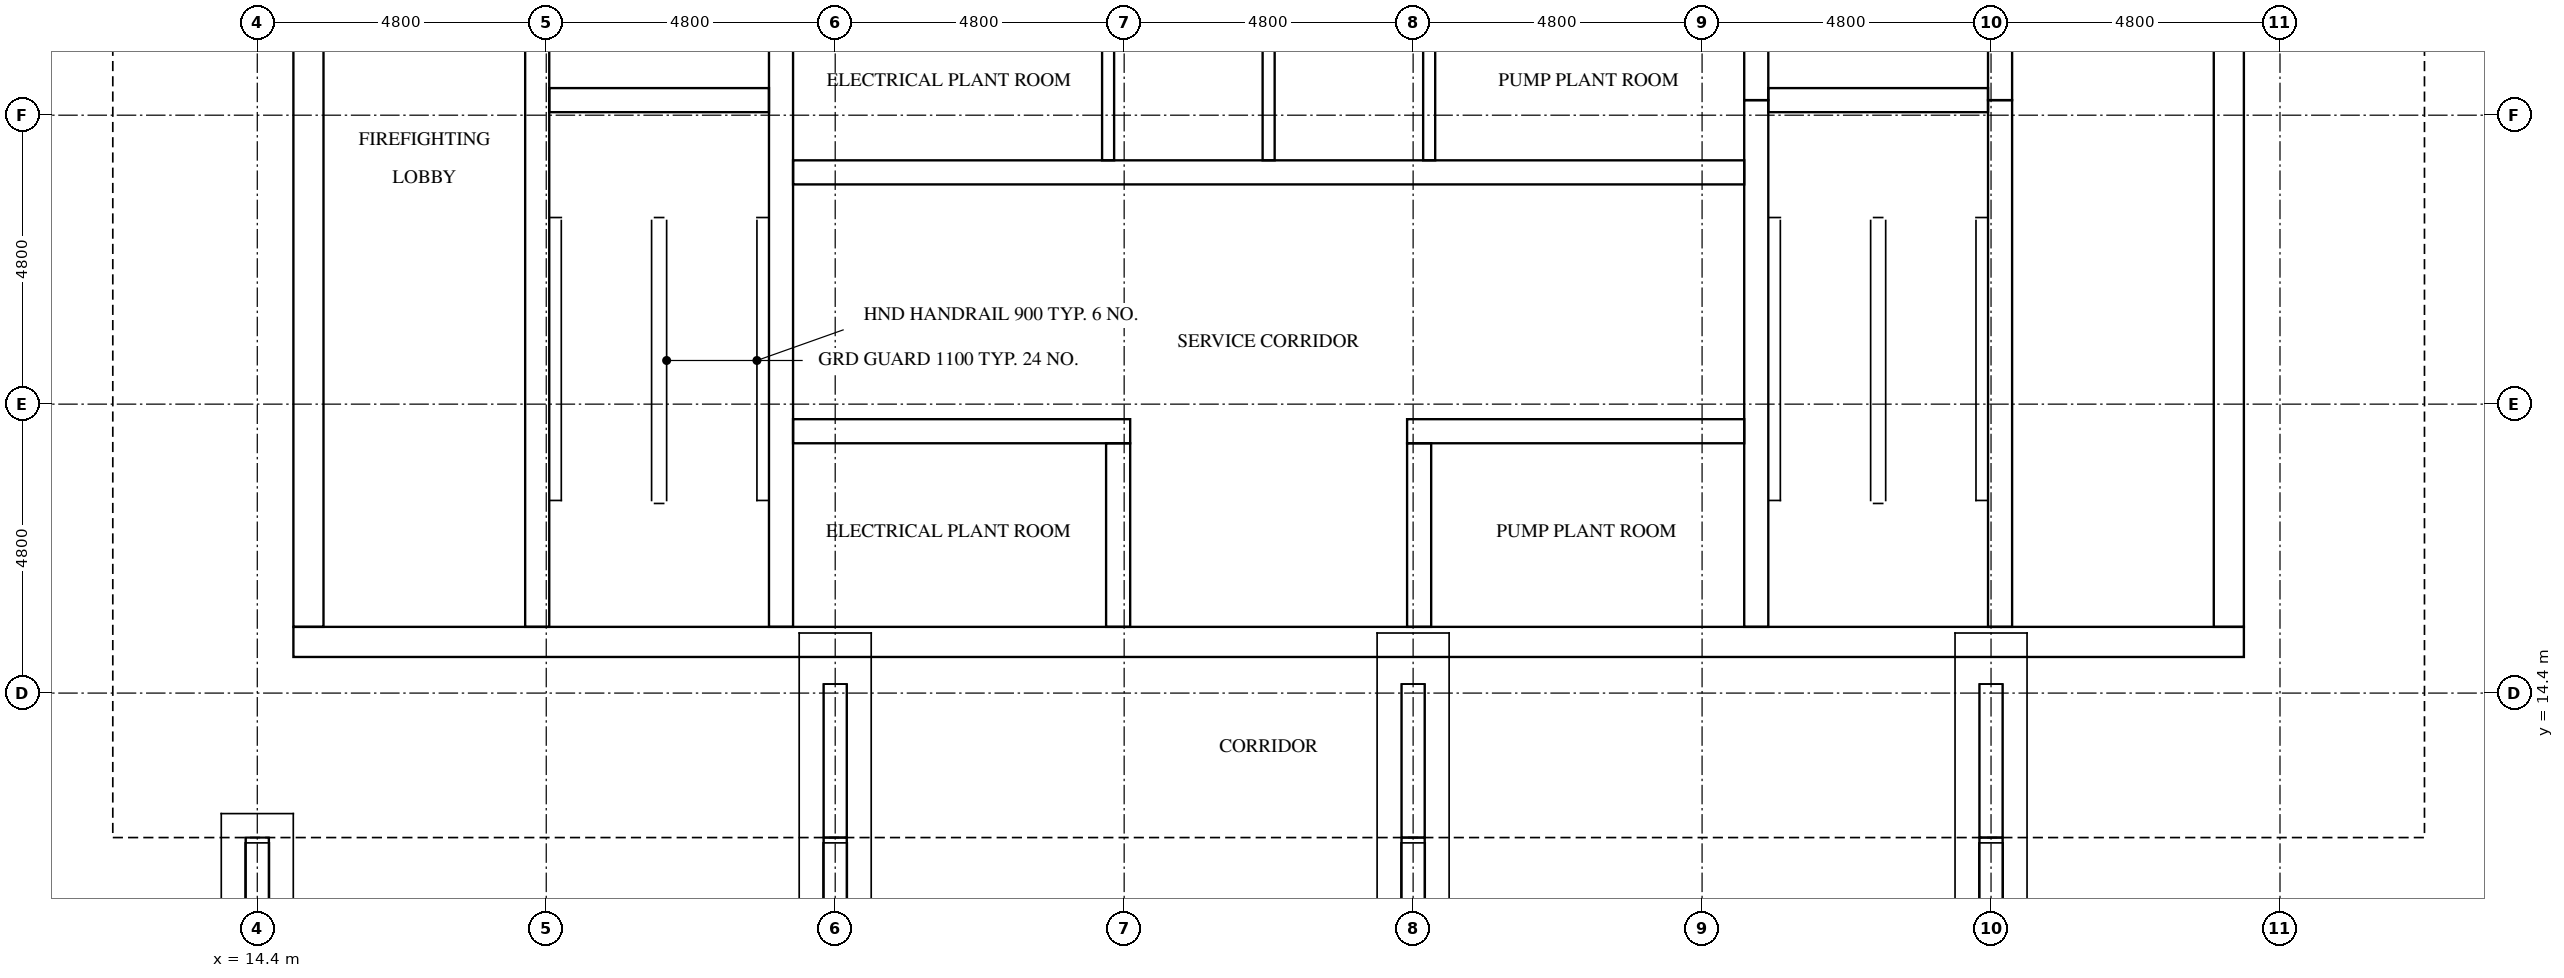
"""IFC4 building model, lengths in metres.
Left out: names, types, materials, properties, quantities, classifications, styles, units other than length and angle.
Written with IfcOpenShell. Run it as: python <this file> out.ifc"""

import sys

from ifc_helpers import new_model, si_unit, direction, frame, frame_2d, origin, place, context, subcontext, project, spatial, rectangle, extrude, element, fill, save


model = new_model("IFC4")
c1 = context("Model", 3, precision=1e-05, world=origin(), true_north=direction((0.0, 1.0)))
c2 = subcontext(c1, "Body", "Model", "MODEL_VIEW")
j1 = project(units=[si_unit("LENGTHUNIT", "METRE"), si_unit("PLANEANGLEUNIT", "RADIAN")], contexts=[c1])
p1 = place(None, origin())
s1 = spatial("IfcSite", under=j1, at=p1, CompositionType="ELEMENT")
p2 = place(p1, origin())
s2 = spatial("IfcBuilding", under=s1, at=p2, CompositionType="ELEMENT")
p3 = place(p2, frame((0.0, 0.0, 263.2)))
s3 = spatial("IfcBuildingStorey", under=s2, at=p3, CompositionType="ELEMENT", Elevation=263.2)
p4 = place(p3, frame((15.0, 15.25, 0.0), z_axis=(0.0, 0.0, 1.0), x_axis=(1.0, 0.0, 0.0)))
e1 = element("IfcWall", 1, at=p4, inside=s3, PredefinedType="SHEAR", context=c2, shape_type="SweptSolid", body=[
    extrude(rectangle(XDim=32.4, YDim=0.5, at=frame_2d((16.2, 0.0))), origin(), (0.0, 0.0, 1.0), 5.1),
])
p5 = place(p4, frame((15.3, 0.0, 0.0)))
e2 = element("IfcOpeningElement", 2, at=p5, cuts=e1, PredefinedType="OPENING", context=c2, shape_type="SweptSolid", body=[
    extrude(rectangle(XDim=1.8, YDim=2.1, at=frame_2d((0.9, 1.05))), frame((0.0, 0.26, 0.0), z_axis=(0.0, -1.0, 0.0), x_axis=(1.0, 0.0, 0.0)), (0.0, 0.0, 1.0), 0.52),
])
p6 = place(p3, frame((15.25, 15.5, 0.0), z_axis=(0.0, 0.0, 1.0), x_axis=(0.0, 1.0, 0.0)))
e3 = element("IfcWall", 3, at=p6, inside=s3, PredefinedType="SHEAR", context=c2, shape_type="SweptSolid", body=[
    extrude(rectangle(XDim=21.8, YDim=0.5, at=frame_2d((10.9, 0.0))), origin(), (0.0, 0.0, 1.0), 5.1),
])
p7 = place(p6, frame((5.26, 0.0, 0.0)))
e4 = element("IfcOpeningElement", 4, at=p7, cuts=e3, PredefinedType="OPENING", context=c2, shape_type="SweptSolid", body=[
    extrude(rectangle(XDim=1.2, YDim=2.1, at=frame_2d((0.6, 1.05))), frame((0.0, 0.26, 0.0), z_axis=(0.0, -1.0, 0.0), x_axis=(1.0, 0.0, 0.0)), (0.0, 0.0, 1.0), 0.52),
])
p8 = place(p3, frame((47.15, 15.5, 0.0), z_axis=(0.0, 0.0, 1.0), x_axis=(0.0, 1.0, 0.0)))
e5 = element("IfcWall", 5, at=p8, inside=s3, PredefinedType="SHEAR", context=c2, shape_type="SweptSolid", body=[
    extrude(rectangle(XDim=21.8, YDim=0.5, at=frame_2d((10.9, 0.0))), origin(), (0.0, 0.0, 1.0), 5.1),
])
p9 = place(p8, frame((10.6, 0.0, 0.0)))
e6 = element("IfcOpeningElement", 6, at=p9, cuts=e5, PredefinedType="OPENING", context=c2, shape_type="SweptSolid", body=[
    extrude(rectangle(XDim=1.2, YDim=2.1, at=frame_2d((0.6, 1.05))), frame((0.0, 0.26, 0.0), z_axis=(0.0, -1.0, 0.0), x_axis=(1.0, 0.0, 0.0)), (0.0, 0.0, 1.0), 0.52),
])
p10 = place(p3, frame((19.05, 15.5, 0.0), z_axis=(0.0, 0.0, 1.0), x_axis=(0.0, 1.0, 0.0)))
e7 = element("IfcWall", 7, at=p10, inside=s3, PredefinedType="SHEAR", context=c2, shape_type="SweptSolid", body=[
    extrude(rectangle(XDim=15.55, YDim=0.4, at=frame_2d((7.775, 0.0))), origin(), (0.0, 0.0, 1.0), 5.1),
])
p11 = place(p10, frame((9.95, 0.0, 0.0)))
e8 = element("IfcOpeningElement", 8, at=p11, cuts=e7, PredefinedType="OPENING", context=c2, shape_type="SweptSolid", body=[
    extrude(rectangle(XDim=1.1, YDim=2.1, at=frame_2d((0.55, 1.05))), frame((0.0, 0.21, 0.0), z_axis=(0.0, -1.0, 0.0), x_axis=(1.0, 0.0, 0.0)), (0.0, 0.0, 1.0), 0.42),
])
p12 = place(p10, frame((13.45, 0.0, 0.0)))
e9 = element("IfcOpeningElement", 9, at=p12, cuts=e7, PredefinedType="OPENING", context=c2, shape_type="SweptSolid", body=[
    extrude(rectangle(XDim=1.1, YDim=2.1, at=frame_2d((0.55, 1.05))), frame((0.0, 0.21, 0.0), z_axis=(0.0, -1.0, 0.0), x_axis=(1.0, 0.0, 0.0)), (0.0, 0.0, 1.0), 0.42),
])
p13 = place(p10, frame((0.7, 0.0, 0.0)))
e10 = element("IfcOpeningElement", 10, at=p13, cuts=e7, PredefinedType="OPENING", context=c2, shape_type="SweptSolid", body=[
    extrude(rectangle(XDim=1.2, YDim=2.1, at=frame_2d((0.6, 1.05))), frame((0.0, 0.21, 0.0), z_axis=(0.0, -1.0, 0.0), x_axis=(1.0, 0.0, 0.0)), (0.0, 0.0, 1.0), 0.42),
])
p14 = place(p3, frame((23.1, 15.5, 0.0), z_axis=(0.0, 0.0, 1.0), x_axis=(0.0, 1.0, 0.0)))
e11 = element("IfcWall", 11, at=p14, inside=s3, PredefinedType="SHEAR", context=c2, shape_type="SweptSolid", body=[
    extrude(rectangle(XDim=21.8, YDim=0.4, at=frame_2d((10.9, 0.0))), origin(), (0.0, 0.0, 1.0), 5.1),
])
p15 = place(p3, frame((39.3, 15.5, 0.0), z_axis=(0.0, 0.0, 1.0), x_axis=(0.0, 1.0, 0.0)))
e12 = element("IfcWall", 12, at=p15, inside=s3, PredefinedType="SHEAR", context=c2, shape_type="SweptSolid", body=[
    extrude(rectangle(XDim=8.75, YDim=0.4, at=frame_2d((4.375, 0.0))), origin(), (0.0, 0.0, 1.0), 5.1),
])
p16 = place(p3, frame((39.3, 24.25, 0.0), z_axis=(0.0, 0.0, 1.0), x_axis=(0.0, 1.0, 0.0)))
e13 = element("IfcWall", 13, at=p16, inside=s3, PredefinedType="SHEAR", context=c2, shape_type="SweptSolid", body=[
    extrude(rectangle(XDim=3.5, YDim=0.4, at=frame_2d((1.75, 0.0))), origin(), (0.0, 0.0, 1.0), 5.1),
])
p17 = place(p3, frame((43.35, 15.5, 0.0), z_axis=(0.0, 0.0, 1.0), x_axis=(0.0, 1.0, 0.0)))
e14 = element("IfcWall", 14, at=p17, inside=s3, PredefinedType="SHEAR", context=c2, shape_type="SweptSolid", body=[
    extrude(rectangle(XDim=8.75, YDim=0.4, at=frame_2d((4.375, 0.0))), origin(), (0.0, 0.0, 1.0), 5.1),
])
p18 = place(p17, frame((0.7, 0.0, 0.0)))
e15 = element("IfcOpeningElement", 15, at=p18, cuts=e14, PredefinedType="OPENING", context=c2, shape_type="SweptSolid", body=[
    extrude(rectangle(XDim=1.2, YDim=2.1, at=frame_2d((0.6, 1.05))), frame((0.0, 0.21, 0.0), z_axis=(0.0, -1.0, 0.0), x_axis=(1.0, 0.0, 0.0)), (0.0, 0.0, 1.0), 0.42),
])
p19 = place(p3, frame((43.35, 24.25, 0.0), z_axis=(0.0, 0.0, 1.0), x_axis=(0.0, 1.0, 0.0)))
e16 = element("IfcWall", 16, at=p19, inside=s3, PredefinedType="SHEAR", context=c2, shape_type="SweptSolid", body=[
    extrude(rectangle(XDim=3.5, YDim=0.4, at=frame_2d((1.75, 0.0))), origin(), (0.0, 0.0, 1.0), 5.1),
])
p20 = place(p19, frame((1.2, 0.0, 0.0)))
e17 = element("IfcOpeningElement", 17, at=p20, cuts=e16, PredefinedType="OPENING", context=c2, shape_type="SweptSolid", body=[
    extrude(rectangle(XDim=1.1, YDim=2.1, at=frame_2d((0.55, 1.05))), frame((0.0, 0.21, 0.0), z_axis=(0.0, -1.0, 0.0), x_axis=(1.0, 0.0, 0.0)), (0.0, 0.0, 1.0), 0.42),
])
for number, where, z_axis, x_axis in (
    (18, (19.25, 24.25, 0.0), (0.0, 0.0, 1.0), (1.0, 0.0, 0.0)),
    (19, (39.5, 24.25, 0.0), (0.0, 0.0, 1.0), (1.0, 0.0, 0.0)),
):
    element("IfcWall", number, at=place(p3, frame(where, z_axis=z_axis, x_axis=x_axis)), inside=s3, PredefinedType="SHEAR", context=c2, shape_type="SweptSolid", body=[
        extrude(rectangle(XDim=3.65, YDim=0.4, at=frame_2d((1.825, 0.0))), origin(), (0.0, 0.0, 1.0), 5.1),
    ])
p21 = place(p3, frame((23.3, 18.75, 0.0), z_axis=(0.0, 0.0, 1.0), x_axis=(1.0, 0.0, 0.0)))
e20 = element("IfcWall", 20, at=p21, inside=s3, PredefinedType="SHEAR", context=c2, shape_type="SweptSolid", body=[
    extrude(rectangle(XDim=5.6, YDim=0.4, at=frame_2d((2.8, 0.0))), origin(), (0.0, 0.0, 1.0), 5.1),
])
p22 = place(p21, frame((2.1, 0.0, 0.0)))
e21 = element("IfcOpeningElement", 21, at=p22, cuts=e20, PredefinedType="OPENING", context=c2, shape_type="SweptSolid", body=[
    extrude(rectangle(XDim=1.0, YDim=2.1, at=frame_2d((0.5, 1.05))), frame((0.0, 0.21, 0.0), z_axis=(0.0, -1.0, 0.0), x_axis=(1.0, 0.0, 0.0)), (0.0, 0.0, 1.0), 0.42),
])
p23 = place(p3, frame((33.5, 18.75, 0.0), z_axis=(0.0, 0.0, 1.0), x_axis=(1.0, 0.0, 0.0)))
e22 = element("IfcWall", 22, at=p23, inside=s3, PredefinedType="SHEAR", context=c2, shape_type="SweptSolid", body=[
    extrude(rectangle(XDim=5.6, YDim=0.4, at=frame_2d((2.8, 0.0))), origin(), (0.0, 0.0, 1.0), 5.1),
])
p24 = place(p23, frame((2.5, 0.0, 0.0)))
e23 = element("IfcOpeningElement", 23, at=p24, cuts=e22, PredefinedType="OPENING", context=c2, shape_type="SweptSolid", body=[
    extrude(rectangle(XDim=1.0, YDim=2.1, at=frame_2d((0.5, 1.05))), frame((0.0, 0.21, 0.0), z_axis=(0.0, -1.0, 0.0), x_axis=(1.0, 0.0, 0.0)), (0.0, 0.0, 1.0), 0.42),
])
p25 = place(p3, frame((23.3, 23.05, 0.0), z_axis=(0.0, 0.0, 1.0), x_axis=(1.0, 0.0, 0.0)))
e24 = element("IfcWall", 24, at=p25, inside=s3, PredefinedType="SHEAR", context=c2, shape_type="SweptSolid", body=[
    extrude(rectangle(XDim=15.8, YDim=0.4, at=frame_2d((7.9, 0.0))), origin(), (0.0, 0.0, 1.0), 5.1),
])
p26 = place(p25, frame((2.067, 0.0, 0.0)))
e25 = element("IfcOpeningElement", 25, at=p26, cuts=e24, PredefinedType="OPENING", context=c2, shape_type="SweptSolid", body=[
    extrude(rectangle(XDim=1.0, YDim=2.1, at=frame_2d((0.5, 1.05))), frame((0.0, 0.21, 0.0), z_axis=(0.0, -1.0, 0.0), x_axis=(1.0, 0.0, 0.0)), (0.0, 0.0, 1.0), 0.42),
])
p27 = place(p25, frame((12.733, 0.0, 0.0)))
e26 = element("IfcOpeningElement", 26, at=p27, cuts=e24, PredefinedType="OPENING", context=c2, shape_type="SweptSolid", body=[
    extrude(rectangle(XDim=1.0, YDim=2.1, at=frame_2d((0.5, 1.05))), frame((0.0, 0.21, 0.0), z_axis=(0.0, -1.0, 0.0), x_axis=(1.0, 0.0, 0.0)), (0.0, 0.0, 1.0), 0.42),
])
for number, where, z_axis, x_axis in (
    (27, (28.7, 15.5, 0.0), (0.0, 0.0, 1.0), (0.0, 1.0, 0.0)),
    (28, (33.7, 15.5, 0.0), (0.0, 0.0, 1.0), (0.0, 1.0, 0.0)),
):
    element("IfcWall", number, at=place(p3, frame(where, z_axis=z_axis, x_axis=x_axis)), inside=s3, PredefinedType="SHEAR", context=c2, shape_type="SweptSolid", body=[
        extrude(rectangle(XDim=3.05, YDim=0.4, at=frame_2d((1.525, 0.0))), origin(), (0.0, 0.0, 1.0), 5.1),
    ])
for number, where, z_axis, x_axis in (
    (29, (28.533, 23.25, 0.0), (0.0, 0.0, 1.0), (0.0, 1.0, 0.0)),
    (30, (31.2, 23.25, 0.0), (0.0, 0.0, 1.0), (0.0, 1.0, 0.0)),
    (31, (33.867, 23.25, 0.0), (0.0, 0.0, 1.0), (0.0, 1.0, 0.0)),
):
    element("IfcWall", number, at=place(p3, frame(where, z_axis=z_axis, x_axis=x_axis)), inside=s3, PredefinedType="SOLIDWALL", context=c2, shape_type="SweptSolid", body=[
        extrude(rectangle(XDim=2.7, YDim=0.2, at=frame_2d((1.35, 0.0))), origin(), (0.0, 0.0, 1.0), 5.1),
    ])
p28 = place(p13, frame((1.2, 0.0, 0.0), z_axis=(0.0, 0.0, 1.0), x_axis=(-1.0, 0.0, 0.0)))
e32 = element("IfcDoor", 32, at=p28, inside=s3, OperationType="SINGLE_SWING_LEFT", PredefinedType="DOOR", context=c2, shape_type="SweptSolid", body=[
    extrude(rectangle(XDim=1.2, YDim=2.1, at=frame_2d((0.6, 1.05))), frame((0.0, 0.025, 0.0), z_axis=(0.0, -1.0, 0.0), x_axis=(1.0, 0.0, 0.0)), (0.0, 0.0, 1.0), 0.05),
])
fill(e10, e32)
p29 = place(p18, origin())
e33 = element("IfcDoor", 33, at=p29, inside=s3, OperationType="SINGLE_SWING_RIGHT", PredefinedType="DOOR", context=c2, shape_type="SweptSolid", body=[
    extrude(rectangle(XDim=1.2, YDim=2.1, at=frame_2d((0.6, 1.05))), frame((0.0, 0.025, 0.0), z_axis=(0.0, -1.0, 0.0), x_axis=(1.0, 0.0, 0.0)), (0.0, 0.0, 1.0), 0.05),
])
fill(e15, e33)
p30 = place(p5, frame((1.8, 0.0, 0.0), z_axis=(0.0, 0.0, 1.0), x_axis=(-1.0, 0.0, 0.0)))
e34 = element("IfcDoor", 34, at=p30, inside=s3, OperationType="DOUBLE_DOOR_SINGLE_SWING", PredefinedType="DOOR", context=c2, shape_type="SweptSolid", body=[
    extrude(rectangle(XDim=1.8, YDim=2.1, at=frame_2d((0.9, 1.05))), frame((0.0, 0.025, 0.0), z_axis=(0.0, -1.0, 0.0), x_axis=(1.0, 0.0, 0.0)), (0.0, 0.0, 1.0), 0.05),
])
fill(e2, e34)
p31 = place(p7, frame((1.2, 0.0, 0.0), z_axis=(0.0, 0.0, 1.0), x_axis=(-1.0, 0.0, 0.0)))
e35 = element("IfcDoor", 35, at=p31, inside=s3, OperationType="SINGLE_SWING_RIGHT", PredefinedType="DOOR", context=c2, shape_type="SweptSolid", body=[
    extrude(rectangle(XDim=1.2, YDim=2.1, at=frame_2d((0.6, 1.05))), frame((0.0, 0.025, 0.0), z_axis=(0.0, -1.0, 0.0), x_axis=(1.0, 0.0, 0.0)), (0.0, 0.0, 1.0), 0.05),
])
fill(e4, e35)
p32 = place(p26, frame((1.0, 0.0, 0.0), z_axis=(0.0, 0.0, 1.0), x_axis=(-1.0, 0.0, 0.0)))
e36 = element("IfcDoor", 36, at=p32, inside=s3, OperationType="SINGLE_SWING_RIGHT", PredefinedType="DOOR", context=c2, shape_type="SweptSolid", body=[
    extrude(rectangle(XDim=1.0, YDim=2.1, at=frame_2d((0.5, 1.05))), frame((0.0, 0.025, 0.0), z_axis=(0.0, -1.0, 0.0), x_axis=(1.0, 0.0, 0.0)), (0.0, 0.0, 1.0), 0.05),
])
fill(e25, e36)
p33 = place(p27, frame((1.0, 0.0, 0.0), z_axis=(0.0, 0.0, 1.0), x_axis=(-1.0, 0.0, 0.0)))
e37 = element("IfcDoor", 37, at=p33, inside=s3, OperationType="SINGLE_SWING_LEFT", PredefinedType="DOOR", context=c2, shape_type="SweptSolid", body=[
    extrude(rectangle(XDim=1.0, YDim=2.1, at=frame_2d((0.5, 1.05))), frame((0.0, 0.025, 0.0), z_axis=(0.0, -1.0, 0.0), x_axis=(1.0, 0.0, 0.0)), (0.0, 0.0, 1.0), 0.05),
])
fill(e26, e37)
p34 = place(p22, origin())
e38 = element("IfcDoor", 38, at=p34, inside=s3, OperationType="SINGLE_SWING_RIGHT", PredefinedType="DOOR", context=c2, shape_type="SweptSolid", body=[
    extrude(rectangle(XDim=1.0, YDim=2.1, at=frame_2d((0.5, 1.05))), frame((0.0, 0.025, 0.0), z_axis=(0.0, -1.0, 0.0), x_axis=(1.0, 0.0, 0.0)), (0.0, 0.0, 1.0), 0.05),
])
fill(e21, e38)
p35 = place(p24, origin())
e39 = element("IfcDoor", 39, at=p35, inside=s3, OperationType="SINGLE_SWING_LEFT", PredefinedType="DOOR", context=c2, shape_type="SweptSolid", body=[
    extrude(rectangle(XDim=1.0, YDim=2.1, at=frame_2d((0.5, 1.05))), frame((0.0, 0.025, 0.0), z_axis=(0.0, -1.0, 0.0), x_axis=(1.0, 0.0, 0.0)), (0.0, 0.0, 1.0), 0.05),
])
fill(e23, e39)
save(model, sys.argv[1])
